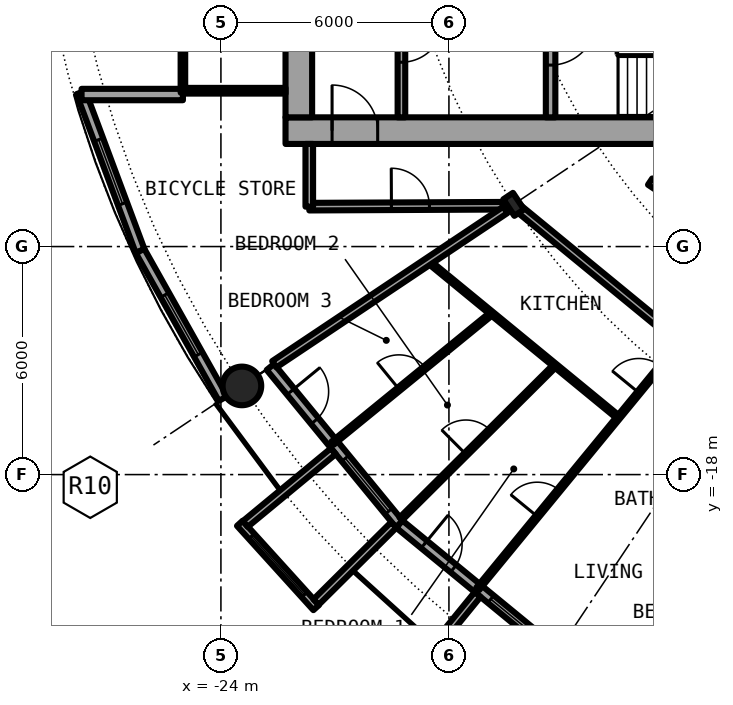
"""IFC4 building model, lengths in metres.
Left out: names, types, materials, properties, quantities, classifications, styles, units other than length and angle.
Written with IfcOpenShell. Run it as: python <this file> out.ifc"""

import sys

from ifc_helpers import new_model, si_unit, direction, frame, frame_2d, origin, origin_2d, place, context, subcontext, project, spatial, rectangle, circle, hollow_circle, i_section, extrude, element, fill, save


model = new_model("IFC4")
c1 = context("Model", 3, precision=1e-05, world=origin(), true_north=direction((0.0, 1.0)))
c2 = subcontext(c1, "Body", "Model", "MODEL_VIEW")
j1 = project(units=[si_unit("LENGTHUNIT", "METRE"), si_unit("PLANEANGLEUNIT", "RADIAN")], contexts=[c1])
p1 = place(None, origin())
s1 = spatial("IfcSite", under=j1, at=p1, CompositionType="ELEMENT")
p2 = place(p1, origin())
s2 = spatial("IfcBuilding", under=s1, at=p2, CompositionType="ELEMENT")
p3 = place(p2, frame((0.0, 0.0, 88.0)))
s3 = spatial("IfcBuildingStorey", under=s2, at=p3, CompositionType="ELEMENT", Elevation=88.0)
p4 = place(p3, frame((-23.448, -15.667, 0.0), z_axis=(0.0, 0.0, 1.0), x_axis=(1.0, 0.0, 0.0)))
e1 = element("IfcColumn", 1, at=p4, inside=s3, PredefinedType="COLUMN", context=c2, shape_type="SweptSolid", body=[
    extrude(hollow_circle(Radius=0.508, WallThickness=0.04, at=origin_2d()), origin(), (0.0, 0.0, 1.0), 3.05),
])
p5 = place(p3, frame((-16.297, -10.889, 0.0), z_axis=(0.0, 0.0, 1.0), x_axis=(-0.831469612303, -0.55557023302, 0.0)))
e2 = element("IfcColumn", 2, at=p5, inside=s3, PredefinedType="COLUMN", context=c2, shape_type="SweptSolid", body=[
    extrude(i_section(OverallWidth=0.306, OverallDepth=0.524, WebThickness=0.021, FlangeThickness=0.04, FilletRadius=0.027, at=origin_2d()), origin(), (0.0, 0.0, 1.0), 3.05),
])
p6 = place(p3, frame((-22.699, -15.167, 0.0), z_axis=(0.0, 0.0, 1.0), x_axis=(0.634382322723, -0.773019449054, 0.0)))
e3 = element("IfcWall", 3, at=p6, inside=s3, PredefinedType="SOLIDWALL", context=c2, shape_type="SweptSolid", body=[
    extrude(rectangle(XDim=5.352, YDim=0.25, at=frame_2d((2.676, 0.0))), origin(), (0.0, 0.0, 1.0), 2.7),
])
p7 = place(p6, frame((0.841, 0.0, 0.0)))
e4 = element("IfcOpeningElement", 4, at=p7, cuts=e3, PredefinedType="OPENING", context=c2, shape_type="SweptSolid", body=[
    extrude(rectangle(XDim=1.0, YDim=2.2, at=frame_2d((0.5, 1.1))), frame((0.0, 0.135, 0.0), z_axis=(0.0, -1.0, 0.0), x_axis=(1.0, 0.0, 0.0)), (0.0, 0.0, 1.0), 0.27),
])
p8 = place(p6, frame((3.111, 0.0, 0.3)))
e5 = element("IfcOpeningElement", 5, at=p8, cuts=e3, PredefinedType="OPENING", context=c2, shape_type="SweptSolid", body=[
    extrude(rectangle(XDim=1.8, YDim=2.1, at=frame_2d((0.9, 1.05))), frame((0.0, 0.135, 0.0), z_axis=(0.0, -1.0, 0.0), x_axis=(1.0, 0.0, 0.0)), (0.0, 0.0, 1.0), 0.27),
])
p9 = place(p3, frame((-23.503, -19.282, -0.03), z_axis=(0.0, 0.0, 1.0), x_axis=(0.671506829416, -0.740998365753, 0.0)))
e6 = element("IfcWall", 6, at=p9, inside=s3, PredefinedType="SOLIDWALL", context=c2, shape_type="SweptSolid", body=[
    extrude(rectangle(XDim=2.993, YDim=0.2, at=frame_2d((1.497, 0.0))), origin(), (0.0, 0.0, 1.0), 2.73),
])
p10 = place(p9, frame((0.457, 0.0, 0.33)))
e7 = element("IfcOpeningElement", 7, at=p10, cuts=e6, PredefinedType="OPENING", context=c2, shape_type="SweptSolid", body=[
    extrude(circle(Radius=1.04, at=frame_2d((1.04, 1.04))), frame((0.0, 0.11, 0.0), z_axis=(0.0, -1.0, 0.0), x_axis=(1.0, 0.0, 0.0)), (0.0, 0.0, 1.0), 0.22),
])
p11 = place(p3, frame((-21.041, -17.384, -0.03), z_axis=(0.0, 0.0, 1.0), x_axis=(-0.770784861449, -0.63709551667, 0.0)))
e8 = element("IfcWall", 8, at=p11, inside=s3, PredefinedType="SOLIDWALL", context=c2, shape_type="SweptSolid", body=[
    extrude(rectangle(XDim=3.006, YDim=0.2, at=frame_2d((1.503, 0.0))), origin(), (0.0, 0.0, 1.0), 2.73),
])
p12 = place(p3, frame((-19.45, -19.323, -0.03), z_axis=(0.0, 0.0, 1.0), x_axis=(-0.709727076896, -0.704476739375, 0.0)))
e9 = element("IfcWall", 9, at=p12, inside=s3, PredefinedType="SOLIDWALL", context=c2, shape_type="SweptSolid", body=[
    extrude(rectangle(XDim=2.883, YDim=0.2, at=frame_2d((1.441, 0.0))), origin(), (0.0, 0.0, 1.0), 2.73),
])
p13 = place(p3, frame((-19.304, -19.304, 0.0), z_axis=(0.0, 0.0, 1.0), x_axis=(0.773019449054, -0.634382322723, 0.0)))
e10 = element("IfcWall", 10, at=p13, inside=s3, PredefinedType="SOLIDWALL", context=c2, shape_type="SweptSolid", body=[
    extrude(rectangle(XDim=5.352, YDim=0.25, at=frame_2d((2.676, 0.0))), origin(), (0.0, 0.0, 1.0), 2.7),
])
p14 = place(p13, frame((0.841, 0.0, 0.0)))
e11 = element("IfcOpeningElement", 11, at=p14, cuts=e10, PredefinedType="OPENING", context=c2, shape_type="SweptSolid", body=[
    extrude(rectangle(XDim=1.0, YDim=2.2, at=frame_2d((0.5, 1.1))), frame((0.0, 0.135, 0.0), z_axis=(0.0, -1.0, 0.0), x_axis=(1.0, 0.0, 0.0)), (0.0, 0.0, 1.0), 0.27),
])
p15 = place(p13, frame((3.111, 0.0, 0.3)))
e12 = element("IfcOpeningElement", 12, at=p15, cuts=e10, PredefinedType="OPENING", context=c2, shape_type="SweptSolid", body=[
    extrude(rectangle(XDim=1.8, YDim=2.1, at=frame_2d((0.9, 1.05))), frame((0.0, 0.135, 0.0), z_axis=(0.0, -1.0, 0.0), x_axis=(1.0, 0.0, 0.0)), (0.0, 0.0, 1.0), 0.27),
])
p16 = place(p3, frame((-17.246, -21.155, -0.03), z_axis=(0.0, 0.0, 1.0), x_axis=(-0.631741648902, -0.775179004516, 0.0)))
e13 = element("IfcWall", 13, at=p16, inside=s3, PredefinedType="SOLIDWALL", context=c2, shape_type="SweptSolid", body=[
    extrude(rectangle(XDim=3.006, YDim=0.2, at=frame_2d((1.503, 0.0))), origin(), (0.0, 0.0, 1.0), 2.73),
])
p17 = place(p3, frame((-27.682, -7.945, 0.0), z_axis=(0.0, 0.0, 1.0), x_axis=(0.349247811493, -0.937030397675, 0.0)))
e14 = element("IfcWall", 14, at=p17, inside=s3, PredefinedType="SOLIDWALL", context=c2, shape_type="SweptSolid", body=[
    extrude(rectangle(XDim=4.452, YDim=0.25, at=frame_2d((2.226, 0.0))), origin(), (0.0, 0.0, 1.0), 2.7),
])
p18 = place(p17, frame((1.327, 0.0, 0.3)))
e15 = element("IfcOpeningElement", 15, at=p18, cuts=e14, PredefinedType="OPENING", context=c2, shape_type="SweptSolid", body=[
    extrude(rectangle(XDim=1.8, YDim=2.1, at=frame_2d((0.9, 1.05))), frame((0.0, 0.135, 0.0), z_axis=(0.0, -1.0, 0.0), x_axis=(1.0, 0.0, 0.0)), (0.0, 0.0, 1.0), 0.27),
])
p19 = place(p3, frame((-26.127, -12.117, 0.0), z_axis=(0.0, 0.0, 1.0), x_axis=(0.489696356642, -0.871893042919, 0.0)))
e16 = element("IfcWall", 16, at=p19, inside=s3, PredefinedType="SOLIDWALL", context=c2, shape_type="SweptSolid", body=[
    extrude(rectangle(XDim=4.454, YDim=0.25, at=frame_2d((2.227, 0.0))), origin(), (0.0, 0.0, 1.0), 2.7),
])
p20 = place(p19, frame((1.327, 0.0, 0.3)))
e17 = element("IfcOpeningElement", 17, at=p20, cuts=e16, PredefinedType="OPENING", context=c2, shape_type="SweptSolid", body=[
    extrude(rectangle(XDim=1.8, YDim=2.1, at=frame_2d((0.9, 1.05))), frame((0.0, 0.135, 0.0), z_axis=(0.0, -1.0, 0.0), x_axis=(1.0, 0.0, 0.0)), (0.0, 0.0, 1.0), 0.27),
])
p21 = place(p3, frame((-25.0, -8.0, 0.0), z_axis=(0.0, 0.0, 1.0), x_axis=(-1.0, 0.0, 0.0)))
e18 = element("IfcWall", 18, at=p21, inside=s3, PredefinedType="SOLIDWALL", context=c2, shape_type="SweptSolid", body=[
    extrude(rectangle(XDim=2.667, YDim=0.3, at=frame_2d((1.333, 0.0))), origin(), (0.0, 0.0, 1.0), 2.7),
])
p22 = place(p3, frame((-22.3, -8.95, 0.0), z_axis=(0.0, 0.0, 1.0), x_axis=(1.0, 0.0, 0.0)))
e19 = element("IfcWall", 19, at=p22, inside=s3, PredefinedType="SHEAR", context=c2, shape_type="SweptSolid", body=[
    extrude(rectangle(XDim=14.0, YDim=0.7, at=frame_2d((7.0, 0.0))), origin(), (0.0, 0.0, 1.0), 3.05),
])
p23 = place(p22, frame((1.225, 0.0, 0.0)))
e20 = element("IfcOpeningElement", 20, at=p23, cuts=e19, PredefinedType="OPENING", context=c2, shape_type="SweptSolid", body=[
    extrude(rectangle(XDim=1.2, YDim=2.3, at=frame_2d((0.6, 1.15))), frame((0.0, 0.36, 0.0), z_axis=(0.0, -1.0, 0.0), x_axis=(1.0, 0.0, 0.0)), (0.0, 0.0, 1.0), 0.72),
])
p24 = place(p3, frame((-21.95, -8.6, 0.0), z_axis=(0.0, 0.0, 1.0), x_axis=(0.0, 1.0, 0.0)))
e21 = element("IfcWall", 21, at=p24, inside=s3, PredefinedType="SHEAR", context=c2, shape_type="SweptSolid", body=[
    extrude(rectangle(XDim=17.2, YDim=0.7, at=frame_2d((8.6, 0.0))), origin(), (0.0, 0.0, 1.0), 3.05),
])
p25 = place(p24, frame((7.7, 0.0, 0.0)))
e22 = element("IfcOpeningElement", 22, at=p25, cuts=e21, PredefinedType="OPENING", context=c2, shape_type="SweptSolid", body=[
    extrude(rectangle(XDim=1.8, YDim=2.3, at=frame_2d((0.9, 1.15))), frame((0.0, 0.36, 0.0), z_axis=(0.0, -1.0, 0.0), x_axis=(1.0, 0.0, 0.0)), (0.0, 0.0, 1.0), 0.72),
])
p26 = place(p3, frame((-15.325, -4.65, 0.0), z_axis=(0.0, 0.0, 1.0), x_axis=(0.0, -1.0, 0.0)))
e23 = element("IfcWall", 23, at=p26, inside=s3, PredefinedType="SHEAR", context=c2, shape_type="SweptSolid", body=[
    extrude(rectangle(XDim=3.95, YDim=0.25, at=frame_2d((1.975, 0.0))), origin(), (0.0, 0.0, 1.0), 3.05),
])
p27 = place(p26, frame((1.375, 0.0, 0.0)))
e24 = element("IfcOpeningElement", 24, at=p27, cuts=e23, PredefinedType="OPENING", context=c2, shape_type="SweptSolid", body=[
    extrude(rectangle(XDim=1.2, YDim=2.3, at=frame_2d((0.6, 1.15))), frame((0.0, 0.135, 0.0), z_axis=(0.0, -1.0, 0.0), x_axis=(1.0, 0.0, 0.0)), (0.0, 0.0, 1.0), 0.27),
])
p28 = place(p3, frame((-19.25, -1.575, 0.0), z_axis=(0.0, 0.0, 1.0), x_axis=(0.0, -1.0, 0.0)))
e25 = element("IfcWall", 25, at=p28, inside=s3, PredefinedType="SOLIDWALL", context=c2, shape_type="SweptSolid", body=[
    extrude(rectangle(XDim=7.025, YDim=0.2, at=frame_2d((3.513, 0.0))), origin(), (0.0, 0.0, 1.0), 2.7),
])
p29 = place(p28, frame((4.475, 0.0, 0.0)))
e26 = element("IfcOpeningElement", 26, at=p29, cuts=e25, PredefinedType="OPENING", context=c2, shape_type="SweptSolid", body=[
    extrude(rectangle(XDim=1.1, YDim=2.3, at=frame_2d((0.55, 1.15))), frame((0.0, 0.11, 0.0), z_axis=(0.0, -1.0, 0.0), x_axis=(1.0, 0.0, 0.0)), (0.0, 0.0, 1.0), 0.22),
])
p30 = place(p3, frame((-22.3, -7.9, 0.0), z_axis=(0.0, 0.0, 1.0), x_axis=(-1.0, 0.0, 0.0)))
e27 = element("IfcWall", 27, at=p30, inside=s3, PredefinedType="PARTITIONING", context=c2, shape_type="SweptSolid", body=[
    extrude(rectangle(XDim=2.64, YDim=0.15, at=frame_2d((1.32, 0.0))), origin(), (0.0, 0.0, 1.0), 2.7),
])
p31 = place(p3, frame((-25.0, 7.95, 0.0), z_axis=(0.0, 0.0, 1.0), x_axis=(0.0, -1.0, 0.0)))
e28 = element("IfcWall", 28, at=p31, inside=s3, PredefinedType="PARTITIONING", context=c2, shape_type="SweptSolid", body=[
    extrude(rectangle(XDim=15.9, YDim=0.12, at=frame_2d((7.95, 0.0))), origin(), (0.0, 0.0, 1.0), 2.7),
])
p32 = place(p31, frame((0.95, 0.0, 0.1)))
e29 = element("IfcOpeningElement", 29, at=p32, cuts=e28, PredefinedType="OPENING", context=c2, shape_type="SweptSolid", body=[
    extrude(rectangle(XDim=14.0, YDim=2.35, at=frame_2d((7.0, 1.175))), frame((0.0, 0.07, 0.0), z_axis=(0.0, -1.0, 0.0), x_axis=(1.0, 0.0, 0.0)), (0.0, 0.0, 1.0), 0.14),
])
p33 = place(p3, frame((-18.542, -12.389, 0.0), z_axis=(0.0, 0.0, 1.0), x_axis=(0.77296666644, -0.634446634929, 0.0)))
e30 = element("IfcWall", 30, at=p33, inside=s3, PredefinedType="PARTITIONING", context=c2, shape_type="SweptSolid", body=[
    extrude(rectangle(XDim=6.474, YDim=0.1, at=frame_2d((3.237, 0.0))), origin(), (0.0, 0.0, 1.0), 2.7),
])
p34 = place(p3, frame((-16.173, -10.991, 0.0), z_axis=(0.0, 0.0, 1.0), x_axis=(0.773013989296, -0.634388975591, 0.0)))
e31 = element("IfcWall", 31, at=p34, inside=s3, PredefinedType="PARTITIONING", context=c2, shape_type="SweptSolid", body=[
    extrude(rectangle(XDim=11.219, YDim=0.2, at=frame_2d((5.609, 0.0))), origin(), (0.0, 0.0, 1.0), 2.38),
])
p35 = place(p34, frame((6.278, 0.0, 0.0)))
e32 = element("IfcOpeningElement", 32, at=p35, cuts=e31, PredefinedType="OPENING", context=c2, shape_type="SweptSolid", body=[
    extrude(rectangle(XDim=1.0, YDim=2.3, at=frame_2d((0.5, 1.15))), frame((0.0, 0.11, 0.0), z_axis=(0.0, -1.0, 0.0), x_axis=(1.0, 0.0, 0.0)), (0.0, 0.0, 1.0), 0.22),
])
p36 = place(p3, frame((-12.706, -10.291, 0.0), z_axis=(0.0, 0.0, 1.0), x_axis=(0.831588572532, -0.555392155178, 0.0)))
e33 = element("IfcWall", 33, at=p36, inside=s3, PredefinedType="PARTITIONING", context=c2, shape_type="SweptSolid", body=[
    extrude(rectangle(XDim=11.314, YDim=0.2, at=frame_2d((5.657, 0.0))), origin(), (0.0, 0.0, 1.0), 2.7),
])
p37 = place(p36, frame((5.966, 0.0, 0.0)))
e34 = element("IfcOpeningElement", 34, at=p37, cuts=e33, PredefinedType="OPENING", context=c2, shape_type="SweptSolid", body=[
    extrude(rectangle(XDim=1.0, YDim=2.3, at=frame_2d((0.5, 1.15))), frame((0.0, 0.11, 0.0), z_axis=(0.0, -1.0, 0.0), x_axis=(1.0, 0.0, 0.0)), (0.0, 0.0, 1.0), 0.22),
])
p38 = place(p3, frame((-21.675, -10.95, 0.0), z_axis=(0.0, 0.0, 1.0), x_axis=(0.999988944514, 0.004702217579, 0.0)))
e35 = element("IfcWall", 35, at=p38, inside=s3, PredefinedType="PARTITIONING", context=c2, shape_type="SweptSolid", body=[
    extrude(rectangle(XDim=5.088, YDim=0.2, at=frame_2d((2.544, 0.0))), origin(), (0.0, 0.0, 1.0), 2.7),
])
p39 = place(p38, frame((2.162, 0.0, 0.0)))
e36 = element("IfcOpeningElement", 36, at=p39, cuts=e35, PredefinedType="OPENING", context=c2, shape_type="SweptSolid", body=[
    extrude(rectangle(XDim=1.0, YDim=2.3, at=frame_2d((0.5, 1.15))), frame((0.0, 0.11, 0.0), z_axis=(0.0, -1.0, 0.0), x_axis=(1.0, 0.0, 0.0)), (0.0, 0.0, 1.0), 0.22),
])
p40 = place(p3, frame((-22.595, -15.097, 0.0), z_axis=(0.0, 0.0, 1.0), x_axis=(0.831505405283, 0.555516661303, 0.0)))
e37 = element("IfcWall", 37, at=p40, inside=s3, PredefinedType="PARTITIONING", context=c2, shape_type="SweptSolid", body=[
    extrude(rectangle(XDim=7.312, YDim=0.2, at=frame_2d((3.656, 0.0))), origin(), (0.0, 0.0, 1.0), 2.7),
])
p41 = place(p3, frame((-21.061, -17.173, 0.0), z_axis=(0.0, 0.0, 1.0), x_axis=(0.774926754572, 0.632051046236, 0.0)))
e38 = element("IfcWall", 38, at=p41, inside=s3, PredefinedType="PARTITIONING", context=c2, shape_type="SweptSolid", body=[
    extrude(rectangle(XDim=5.403, YDim=0.1, at=frame_2d((2.702, 0.0))), origin(), (0.0, 0.0, 1.0), 2.7),
])
p42 = place(p41, frame((2.252, 0.0, 0.0)))
e39 = element("IfcOpeningElement", 39, at=p42, cuts=e38, PredefinedType="OPENING", context=c2, shape_type="SweptSolid", body=[
    extrude(rectangle(XDim=0.9, YDim=2.3, at=frame_2d((0.45, 1.15))), frame((0.0, 0.06, 0.0), z_axis=(0.0, -1.0, 0.0), x_axis=(1.0, 0.0, 0.0)), (0.0, 0.0, 1.0), 0.12),
])
p43 = place(p3, frame((-19.265, -19.166, 0.0), z_axis=(0.0, 0.0, 1.0), x_axis=(0.708831450128, 0.705377895393, 0.0)))
e40 = element("IfcWall", 40, at=p43, inside=s3, PredefinedType="PARTITIONING", context=c2, shape_type="SweptSolid", body=[
    extrude(rectangle(XDim=5.726, YDim=0.1, at=frame_2d((2.863, 0.0))), origin(), (0.0, 0.0, 1.0), 2.7),
])
p44 = place(p43, frame((2.413, 0.0, 0.0)))
e41 = element("IfcOpeningElement", 41, at=p44, cuts=e40, PredefinedType="OPENING", context=c2, shape_type="SweptSolid", body=[
    extrude(rectangle(XDim=0.9, YDim=2.3, at=frame_2d((0.45, 1.15))), frame((0.0, 0.06, 0.0), z_axis=(0.0, -1.0, 0.0), x_axis=(1.0, 0.0, 0.0)), (0.0, 0.0, 1.0), 0.12),
])
p45 = place(p3, frame((-17.241, -21.006, 0.0), z_axis=(0.0, 0.0, 1.0), x_axis=(0.634522338131, 0.772904523478, 0.0)))
e42 = element("IfcWall", 42, at=p45, inside=s3, PredefinedType="PARTITIONING", context=c2, shape_type="SweptSolid", body=[
    extrude(rectangle(XDim=8.419, YDim=0.1, at=frame_2d((4.209, 0.0))), origin(), (0.0, 0.0, 1.0), 2.7),
])
p46 = place(p45, frame((6.677, 0.0, 0.0)))
e43 = element("IfcOpeningElement", 43, at=p46, cuts=e42, PredefinedType="OPENING", context=c2, shape_type="SweptSolid", body=[
    extrude(rectangle(XDim=0.9, YDim=2.3, at=frame_2d((0.45, 1.15))), frame((0.0, 0.06, 0.0), z_axis=(0.0, -1.0, 0.0), x_axis=(1.0, 0.0, 0.0)), (0.0, 0.0, 1.0), 0.12),
])
p47 = place(p45, frame((2.466, 0.0, 0.0)))
e44 = element("IfcOpeningElement", 44, at=p47, cuts=e42, PredefinedType="OPENING", context=c2, shape_type="SweptSolid", body=[
    extrude(rectangle(XDim=0.9, YDim=2.3, at=frame_2d((0.45, 1.15))), frame((0.0, 0.06, 0.0), z_axis=(0.0, -1.0, 0.0), x_axis=(1.0, 0.0, 0.0)), (0.0, 0.0, 1.0), 0.12),
])
p48 = place(p3, frame((-21.675, -10.95, 0.0), z_axis=(0.0, 0.0, 1.0), x_axis=(0.0, 1.0, 0.0)))
e45 = element("IfcWall", 45, at=p48, inside=s3, PredefinedType="PARTITIONING", context=c2, shape_type="SweptSolid", body=[
    extrude(rectangle(XDim=1.65, YDim=0.2, at=frame_2d((0.825, 0.0))), origin(), (0.0, 0.0, 1.0), 2.7),
])
p49 = place(p7, origin())
e46 = element("IfcDoor", 46, at=p49, inside=s3, OperationType="SINGLE_SWING_LEFT", PredefinedType="DOOR", context=c2, shape_type="SweptSolid", body=[
    extrude(rectangle(XDim=1.0, YDim=2.2, at=frame_2d((0.5, 1.1))), frame((0.0, 0.025, 0.0), z_axis=(0.0, -1.0, 0.0), x_axis=(1.0, 0.0, 0.0)), (0.0, 0.0, 1.0), 0.05),
])
fill(e4, e46)
p50 = place(p8, origin())
e47 = element("IfcWindow", 47, at=p50, inside=s3, PartitioningType="SINGLE_PANEL", PredefinedType="WINDOW", context=c2, shape_type="SweptSolid", body=[
    extrude(rectangle(XDim=1.8, YDim=2.1, at=frame_2d((0.9, 1.05))), frame((0.0, 0.03, 0.0), z_axis=(0.0, -1.0, 0.0), x_axis=(1.0, 0.0, 0.0)), (0.0, 0.0, 1.0), 0.06),
])
fill(e5, e47)
p51 = place(p10, origin())
e48 = element("IfcWindow", 48, at=p51, inside=s3, PartitioningType="SINGLE_PANEL", PredefinedType="WINDOW", context=c2, shape_type="SweptSolid", body=[
    extrude(circle(Radius=1.04, at=frame_2d((1.04, 1.04))), frame((0.0, 0.03, 0.0), z_axis=(0.0, -1.0, 0.0), x_axis=(1.0, 0.0, 0.0)), (0.0, 0.0, 1.0), 0.06),
])
fill(e7, e48)
p52 = place(p14, origin())
e49 = element("IfcDoor", 49, at=p52, inside=s3, OperationType="SINGLE_SWING_LEFT", PredefinedType="DOOR", context=c2, shape_type="SweptSolid", body=[
    extrude(rectangle(XDim=1.0, YDim=2.2, at=frame_2d((0.5, 1.1))), frame((0.0, 0.025, 0.0), z_axis=(0.0, -1.0, 0.0), x_axis=(1.0, 0.0, 0.0)), (0.0, 0.0, 1.0), 0.05),
])
fill(e11, e49)
p53 = place(p15, origin())
e50 = element("IfcWindow", 50, at=p53, inside=s3, PartitioningType="SINGLE_PANEL", PredefinedType="WINDOW", context=c2, shape_type="SweptSolid", body=[
    extrude(rectangle(XDim=1.8, YDim=2.1, at=frame_2d((0.9, 1.05))), frame((0.0, 0.03, 0.0), z_axis=(0.0, -1.0, 0.0), x_axis=(1.0, 0.0, 0.0)), (0.0, 0.0, 1.0), 0.06),
])
fill(e12, e50)
p54 = place(p18, origin())
e51 = element("IfcWindow", 51, at=p54, inside=s3, PartitioningType="SINGLE_PANEL", PredefinedType="WINDOW", context=c2, shape_type="SweptSolid", body=[
    extrude(rectangle(XDim=1.8, YDim=2.1, at=frame_2d((0.9, 1.05))), frame((0.0, 0.03, 0.0), z_axis=(0.0, -1.0, 0.0), x_axis=(1.0, 0.0, 0.0)), (0.0, 0.0, 1.0), 0.06),
])
fill(e15, e51)
p55 = place(p20, origin())
e52 = element("IfcWindow", 52, at=p55, inside=s3, PartitioningType="SINGLE_PANEL", PredefinedType="WINDOW", context=c2, shape_type="SweptSolid", body=[
    extrude(rectangle(XDim=1.8, YDim=2.1, at=frame_2d((0.9, 1.05))), frame((0.0, 0.03, 0.0), z_axis=(0.0, -1.0, 0.0), x_axis=(1.0, 0.0, 0.0)), (0.0, 0.0, 1.0), 0.06),
])
fill(e17, e52)
p56 = place(p27, origin())
e53 = element("IfcDoor", 53, at=p56, inside=s3, OperationType="SINGLE_SWING_LEFT", PredefinedType="DOOR", context=c2, shape_type="SweptSolid", body=[
    extrude(rectangle(XDim=1.2, YDim=2.3, at=frame_2d((0.6, 1.15))), frame((0.0, 0.025, 0.0), z_axis=(0.0, -1.0, 0.0), x_axis=(1.0, 0.0, 0.0)), (0.0, 0.0, 1.0), 0.05),
])
fill(e24, e53)
p57 = place(p29, origin())
e54 = element("IfcDoor", 54, at=p57, inside=s3, OperationType="SINGLE_SWING_LEFT", PredefinedType="DOOR", context=c2, shape_type="SweptSolid", body=[
    extrude(rectangle(XDim=1.1, YDim=2.3, at=frame_2d((0.55, 1.15))), frame((0.0, 0.025, 0.0), z_axis=(0.0, -1.0, 0.0), x_axis=(1.0, 0.0, 0.0)), (0.0, 0.0, 1.0), 0.05),
])
fill(e26, e54)
p58 = place(p23, origin())
e55 = element("IfcDoor", 55, at=p58, inside=s3, OperationType="SINGLE_SWING_RIGHT", PredefinedType="DOOR", context=c2, shape_type="SweptSolid", body=[
    extrude(rectangle(XDim=1.2, YDim=2.3, at=frame_2d((0.6, 1.15))), frame((0.0, 0.025, 0.0), z_axis=(0.0, -1.0, 0.0), x_axis=(1.0, 0.0, 0.0)), (0.0, 0.0, 1.0), 0.05),
])
fill(e20, e55)
p59 = place(p32, origin())
e56 = element("IfcWindow", 56, at=p59, inside=s3, PartitioningType="SINGLE_PANEL", PredefinedType="WINDOW", context=c2, shape_type="SweptSolid", body=[
    extrude(rectangle(XDim=14.0, YDim=2.35, at=frame_2d((7.0, 1.175))), frame((0.0, 0.03, 0.0), z_axis=(0.0, -1.0, 0.0), x_axis=(1.0, 0.0, 0.0)), (0.0, 0.0, 1.0), 0.06),
])
fill(e29, e56)
p60 = place(p46, origin())
e57 = element("IfcDoor", 57, at=p60, inside=s3, OperationType="SINGLE_SWING_RIGHT", PredefinedType="DOOR", context=c2, shape_type="SweptSolid", body=[
    extrude(rectangle(XDim=0.9, YDim=2.3, at=frame_2d((0.45, 1.15))), frame((0.0, 0.025, 0.0), z_axis=(0.0, -1.0, 0.0), x_axis=(1.0, 0.0, 0.0)), (0.0, 0.0, 1.0), 0.05),
])
fill(e43, e57)
p61 = place(p47, origin())
e58 = element("IfcDoor", 58, at=p61, inside=s3, OperationType="SINGLE_SWING_LEFT", PredefinedType="DOOR", context=c2, shape_type="SweptSolid", body=[
    extrude(rectangle(XDim=0.9, YDim=2.3, at=frame_2d((0.45, 1.15))), frame((0.0, 0.025, 0.0), z_axis=(0.0, -1.0, 0.0), x_axis=(1.0, 0.0, 0.0)), (0.0, 0.0, 1.0), 0.05),
])
fill(e44, e58)
p62 = place(p44, origin())
e59 = element("IfcDoor", 59, at=p62, inside=s3, OperationType="SINGLE_SWING_LEFT", PredefinedType="DOOR", context=c2, shape_type="SweptSolid", body=[
    extrude(rectangle(XDim=0.9, YDim=2.3, at=frame_2d((0.45, 1.15))), frame((0.0, 0.025, 0.0), z_axis=(0.0, -1.0, 0.0), x_axis=(1.0, 0.0, 0.0)), (0.0, 0.0, 1.0), 0.05),
])
fill(e41, e59)
p63 = place(p42, origin())
e60 = element("IfcDoor", 60, at=p63, inside=s3, OperationType="SINGLE_SWING_RIGHT", PredefinedType="DOOR", context=c2, shape_type="SweptSolid", body=[
    extrude(rectangle(XDim=0.9, YDim=2.3, at=frame_2d((0.45, 1.15))), frame((0.0, 0.025, 0.0), z_axis=(0.0, -1.0, 0.0), x_axis=(1.0, 0.0, 0.0)), (0.0, 0.0, 1.0), 0.05),
])
fill(e39, e60)
p64 = place(p39, origin())
e61 = element("IfcDoor", 61, at=p64, inside=s3, OperationType="SINGLE_SWING_RIGHT", PredefinedType="DOOR", context=c2, shape_type="SweptSolid", body=[
    extrude(rectangle(XDim=1.0, YDim=2.3, at=frame_2d((0.5, 1.15))), frame((0.0, 0.025, 0.0), z_axis=(0.0, -1.0, 0.0), x_axis=(1.0, 0.0, 0.0)), (0.0, 0.0, 1.0), 0.05),
])
fill(e36, e61)
save(model, sys.argv[1])
